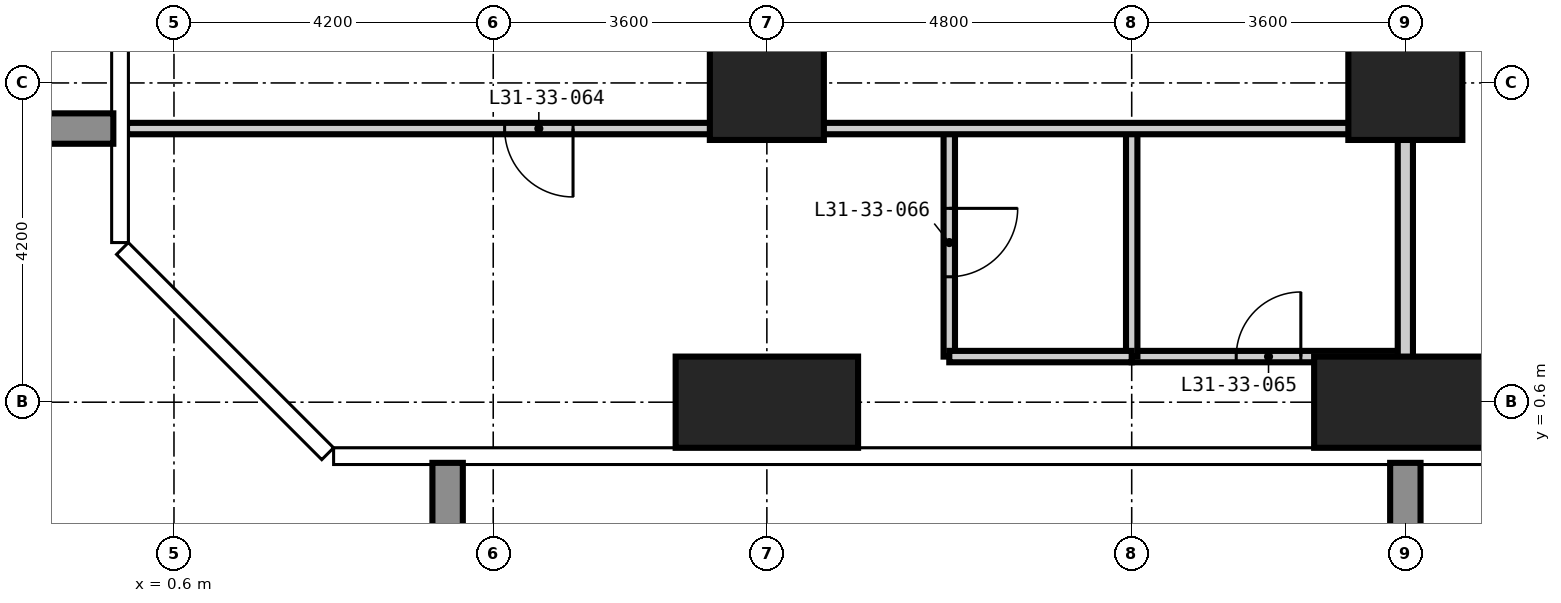
"""IFC4 building model, lengths in metres.
Left out: names, types, materials, properties, quantities, classifications, styles, units other than length and angle.
Written with IfcOpenShell. Run it as: python <this file> out.ifc"""

import sys

from ifc_helpers import new_model, si_unit, direction, frame, frame_2d, origin, origin_2d, place, context, subcontext, project, spatial, rectangle, extrude, element, fill, save


model = new_model("IFC4")
c1 = context("Model", 3, precision=1e-05, world=origin(), true_north=direction((0.0, 1.0)))
c2 = subcontext(c1, "Body", "Model", "MODEL_VIEW")
j1 = project(units=[si_unit("LENGTHUNIT", "METRE"), si_unit("PLANEANGLEUNIT", "RADIAN")], contexts=[c1])
p1 = place(None, origin())
s1 = spatial("IfcSite", under=j1, at=p1, CompositionType="ELEMENT")
p2 = place(p1, origin())
s2 = spatial("IfcBuilding", under=s1, at=p2, CompositionType="ELEMENT")
p3 = place(p2, frame((0.0, 0.0, 122.4)))
s3 = spatial("IfcBuildingStorey", under=s2, at=p3, CompositionType="ELEMENT", Elevation=122.4)
p4 = place(p3, frame((8.4, 0.6, -0.35), z_axis=(0.0, 0.0, 1.0), x_axis=(1.0, 0.0, 0.0)))
e1 = element("IfcColumn", 1, at=p4, inside=s3, PredefinedType="COLUMN", context=c2, shape_type="SweptSolid", body=[
    extrude(rectangle(XDim=2.4, YDim=1.2, at=origin_2d()), origin(), (0.0, 0.0, 1.0), 3.6),
])
p5 = place(p3, frame((8.4, 4.8, -0.35), z_axis=(0.0, 0.0, 1.0), x_axis=(1.0, 0.0, 0.0)))
e2 = element("IfcColumn", 2, at=p5, inside=s3, PredefinedType="COLUMN", context=c2, shape_type="SweptSolid", body=[
    extrude(rectangle(XDim=1.5, YDim=1.5, at=origin_2d()), origin(), (0.0, 0.0, 1.0), 3.6),
])
p6 = place(p3, frame((16.8, 0.6, -0.35), z_axis=(0.0, 0.0, 1.0), x_axis=(1.0, 0.0, 0.0)))
e3 = element("IfcColumn", 3, at=p6, inside=s3, PredefinedType="COLUMN", context=c2, shape_type="SweptSolid", body=[
    extrude(rectangle(XDim=2.4, YDim=1.2, at=origin_2d()), origin(), (0.0, 0.0, 1.0), 3.6),
])
p7 = place(p3, frame((16.8, 4.8, -0.35), z_axis=(0.0, 0.0, 1.0), x_axis=(1.0, 0.0, 0.0)))
e4 = element("IfcColumn", 4, at=p7, inside=s3, PredefinedType="COLUMN", context=c2, shape_type="SweptSolid", body=[
    extrude(rectangle(XDim=1.5, YDim=1.5, at=origin_2d()), origin(), (0.0, 0.0, 1.0), 3.6),
])
p8 = place(p3, frame((13.2, 1.2, 0.0), z_axis=(0.0, 0.0, 1.0), x_axis=(1.0, 0.0, 0.0)))
e5 = element("IfcWall", 5, at=p8, inside=s3, PredefinedType="PARTITIONING", context=c2, shape_type="SweptSolid", body=[
    extrude(rectangle(XDim=3.6, YDim=0.15, at=frame_2d((1.8, 0.0))), origin(), (0.0, 0.0, 1.0), 3.25),
])
p9 = place(p8, frame((1.375, 0.0, 0.0)))
e6 = element("IfcOpeningElement", 6, at=p9, cuts=e5, PredefinedType="OPENING", context=c2, shape_type="SweptSolid", body=[
    extrude(rectangle(XDim=0.85, YDim=2.1, at=frame_2d((0.425, 1.05))), frame((0.0, 0.085, 0.0), z_axis=(0.0, -1.0, 0.0), x_axis=(1.0, 0.0, 0.0)), (0.0, 0.0, 1.0), 0.17),
])
p10 = place(p3, frame((16.8, -0.018, 0.0), z_axis=(0.0, 0.0, 1.0), x_axis=(0.0, 1.0, 0.0)))
e7 = element("IfcWall", 7, at=p10, inside=s3, PredefinedType="PARTITIONING", context=c2, shape_type="SweptSolid", body=[
    extrude(rectangle(XDim=13.693, YDim=0.2, at=frame_2d((6.847, 0.0))), origin(), (0.0, 0.0, 1.0), 3.25),
])
p11 = place(p3, frame((10.8, 1.2, 0.0), z_axis=(0.0, 0.0, 1.0), x_axis=(0.0, 1.0, 0.0)))
e8 = element("IfcWall", 8, at=p11, inside=s3, PredefinedType="PARTITIONING", context=c2, shape_type="SweptSolid", body=[
    extrude(rectangle(XDim=3.0, YDim=0.15, at=frame_2d((1.5, 0.0))), origin(), (0.0, 0.0, 1.0), 3.25),
])
p12 = place(p11, frame((1.05, 0.0, 0.0)))
e9 = element("IfcOpeningElement", 9, at=p12, cuts=e8, PredefinedType="OPENING", context=c2, shape_type="SweptSolid", body=[
    extrude(rectangle(XDim=0.9, YDim=2.1, at=frame_2d((0.45, 1.05))), frame((0.0, 0.085, 0.0), z_axis=(0.0, -1.0, 0.0), x_axis=(1.0, 0.0, 0.0)), (0.0, 0.0, 1.0), 0.17),
])
p13 = place(p3, frame((13.2, 1.2, 0.0), z_axis=(0.0, 0.0, 1.0), x_axis=(0.0, 1.0, 0.0)))
e10 = element("IfcWall", 10, at=p13, inside=s3, PredefinedType="PARTITIONING", context=c2, shape_type="SweptSolid", body=[
    extrude(rectangle(XDim=3.0, YDim=0.15, at=frame_2d((1.5, 0.0))), origin(), (0.0, 0.0, 1.0), 3.25),
])
p14 = place(p3, frame((10.8, 1.2, 0.0), z_axis=(0.0, 0.0, 1.0), x_axis=(1.0, 0.0, 0.0)))
e11 = element("IfcWall", 11, at=p14, inside=s3, PredefinedType="PARTITIONING", context=c2, shape_type="SweptSolid", body=[
    extrude(rectangle(XDim=2.4, YDim=0.15, at=frame_2d((1.2, 0.0))), origin(), (0.0, 0.0, 1.0), 3.25),
])
p15 = place(p3, frame((-0.018, 4.2, 0.0), z_axis=(0.0, 0.0, 1.0), x_axis=(1.0, 0.0, 0.0)))
e12 = element("IfcWall", 12, at=p15, inside=s3, PredefinedType="PARTITIONING", context=c2, shape_type="SweptSolid", body=[
    extrude(rectangle(XDim=16.818, YDim=0.15, at=frame_2d((8.409, 0.0))), origin(), (0.0, 0.0, 1.0), 3.25),
])
p16 = place(p15, frame((4.968, 0.0, 0.0)))
e13 = element("IfcOpeningElement", 13, at=p16, cuts=e12, PredefinedType="OPENING", context=c2, shape_type="SweptSolid", body=[
    extrude(rectangle(XDim=0.9, YDim=2.1, at=frame_2d((0.45, 1.05))), frame((0.0, 0.085, 0.0), z_axis=(0.0, -1.0, 0.0), x_axis=(1.0, 0.0, 0.0)), (0.0, 0.0, 1.0), 0.17),
])
p17 = place(p16, frame((0.9, 0.0, 0.0), z_axis=(0.0, 0.0, 1.0), x_axis=(-1.0, 0.0, 0.0)))
e14 = element("IfcDoor", 14, at=p17, inside=s3, OperationType="SINGLE_SWING_LEFT", PredefinedType="DOOR", context=c2, shape_type="SweptSolid", body=[
    extrude(rectangle(XDim=0.9, YDim=2.1, at=frame_2d((0.45, 1.05))), frame((0.0, 0.025, 0.0), z_axis=(0.0, -1.0, 0.0), x_axis=(1.0, 0.0, 0.0)), (0.0, 0.0, 1.0), 0.05),
])
fill(e13, e14)
p18 = place(p9, origin())
e15 = element("IfcDoor", 15, at=p18, inside=s3, OperationType="SINGLE_SWING_RIGHT", PredefinedType="DOOR", context=c2, shape_type="SweptSolid", body=[
    extrude(rectangle(XDim=0.85, YDim=2.1, at=frame_2d((0.425, 1.05))), frame((0.0, 0.025, 0.0), z_axis=(0.0, -1.0, 0.0), x_axis=(1.0, 0.0, 0.0)), (0.0, 0.0, 1.0), 0.05),
])
fill(e6, e15)
p19 = place(p12, frame((0.9, 0.0, 0.0), z_axis=(0.0, 0.0, 1.0), x_axis=(-1.0, 0.0, 0.0)))
e16 = element("IfcDoor", 16, at=p19, inside=s3, OperationType="SINGLE_SWING_LEFT", PredefinedType="DOOR", context=c2, shape_type="SweptSolid", body=[
    extrude(rectangle(XDim=0.9, YDim=2.1, at=frame_2d((0.45, 1.05))), frame((0.0, 0.025, 0.0), z_axis=(0.0, -1.0, 0.0), x_axis=(1.0, 0.0, 0.0)), (0.0, 0.0, 1.0), 0.05),
])
fill(e9, e16)
save(model, sys.argv[1])
